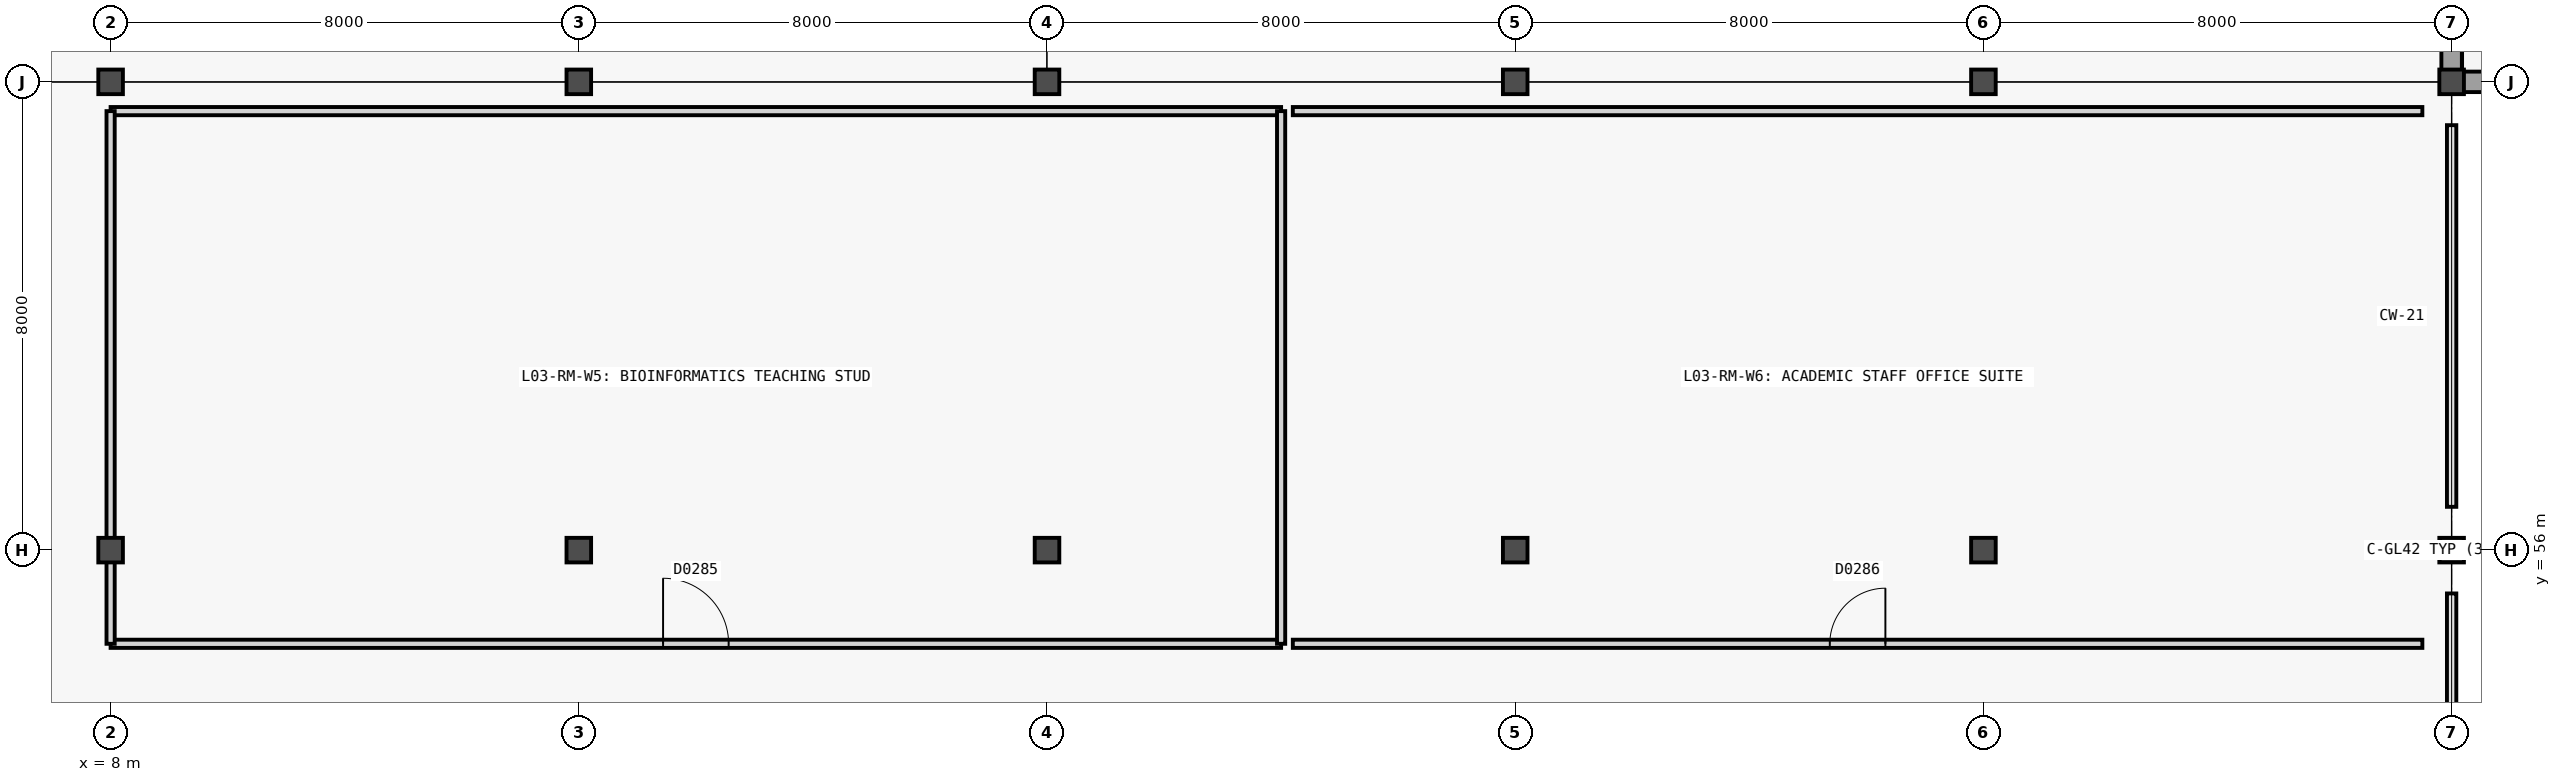
"""IFC4 building model, lengths in metres.
Left out: names, types, materials, properties, quantities, classifications, styles, units other than length and angle.
Written with IfcOpenShell. Run it as: python <this file> out.ifc"""

import sys

from ifc_helpers import new_model, si_unit, direction, frame, frame_2d, origin, origin_2d, place, context, subcontext, project, spatial, rectangle, extrude, element, fill, save


model = new_model("IFC4")
c1 = context("Model", 3, precision=1e-05, world=origin(), true_north=direction((0.0, 1.0)))
c2 = subcontext(c1, "Body", "Model", "MODEL_VIEW")
j1 = project(units=[si_unit("LENGTHUNIT", "METRE"), si_unit("PLANEANGLEUNIT", "RADIAN")], contexts=[c1])
p1 = place(None, origin())
s1 = spatial("IfcSite", under=j1, at=p1, CompositionType="ELEMENT")
p2 = place(p1, origin())
s2 = spatial("IfcBuilding", under=s1, at=p2, CompositionType="ELEMENT")
p3 = place(p2, frame((0.0, 0.0, 14.4)))
s3 = spatial("IfcBuildingStorey", under=s2, at=p3, CompositionType="ELEMENT", Elevation=14.4)
for number, where, z_axis, x_axis in (
    (1, (8.0, 56.0, 0.0), (0.0, 0.0, 1.0), (1.0, 0.0, 0.0)),
    (2, (8.0, 64.0, 0.0), (0.0, 0.0, 1.0), (1.0, 0.0, 0.0)),
    (3, (16.0, 56.0, 0.0), (0.0, 0.0, 1.0), (1.0, 0.0, 0.0)),
    (4, (16.0, 64.0, 0.0), (0.0, 0.0, 1.0), (1.0, 0.0, 0.0)),
    (5, (24.0, 56.0, 0.0), (0.0, 0.0, 1.0), (1.0, 0.0, 0.0)),
    (6, (24.0, 64.0, 0.0), (0.0, 0.0, 1.0), (1.0, 0.0, 0.0)),
    (7, (32.0, 56.0, 0.0), (0.0, 0.0, 1.0), (1.0, 0.0, 0.0)),
    (8, (32.0, 64.0, 0.0), (0.0, 0.0, 1.0), (1.0, 0.0, 0.0)),
    (9, (40.0, 56.0, 0.0), (0.0, 0.0, 1.0), (1.0, 0.0, 0.0)),
    (10, (40.0, 64.0, 0.0), (0.0, 0.0, 1.0), (1.0, 0.0, 0.0)),
    (11, (48.0, 56.0, 0.0), (0.0, 0.0, 1.0), (1.0, 0.0, 0.0)),
    (12, (48.0, 64.0, 0.0), (0.0, 0.0, 1.0), (1.0, 0.0, 0.0)),
):
    element("IfcColumn", number, at=place(p3, frame(where, z_axis=z_axis, x_axis=x_axis)), inside=s3, PredefinedType="COLUMN", context=c2, shape_type="SweptSolid", body=[
        extrude(rectangle(XDim=0.42, YDim=0.42, at=origin_2d()), origin(), (0.0, 0.0, 1.0), 3.6),
    ])
p4 = place(p3, frame((48.0, 64.0, 0.0), z_axis=(0.0, 0.0, 1.0), x_axis=(1.0, 0.0, 0.0)))
e13 = element("IfcWall", 13, at=p4, inside=s3, PredefinedType="SHEAR", context=c2, shape_type="SweptSolid", body=[
    extrude(rectangle(XDim=8.0, YDim=0.35, at=frame_2d((4.0, 0.0))), origin(), (0.0, 0.0, 1.0), 3.6),
])
p5 = place(p3, frame((48.0, 64.0, 0.0), z_axis=(0.0, 0.0, 1.0), x_axis=(0.0, 1.0, 0.0)))
e14 = element("IfcWall", 14, at=p5, inside=s3, PredefinedType="SHEAR", context=c2, shape_type="SweptSolid", body=[
    extrude(rectangle(XDim=8.4, YDim=0.35, at=frame_2d((4.2, 0.0))), origin(), (0.0, 0.0, 1.0), 3.6),
])
p6 = place(p3, frame((8.0, 54.4, 0.0), z_axis=(0.0, 0.0, 1.0), x_axis=(1.0, 0.0, 0.0)))
e15 = element("IfcWall", 15, at=p6, inside=s3, PredefinedType="PARTITIONING", context=c2, shape_type="SweptSolid", body=[
    extrude(rectangle(XDim=20.0, YDim=0.14, at=frame_2d((10.0, 0.0))), origin(), (0.0, 0.0, 1.0), 3.34),
])
p7 = place(p6, frame((9.44, 0.0, 0.0)))
e16 = element("IfcOpeningElement", 16, at=p7, cuts=e15, PredefinedType="OPENING", context=c2, shape_type="SweptSolid", body=[
    extrude(rectangle(XDim=1.12, YDim=2.15, at=frame_2d((0.56, 1.075))), frame((0.0, 0.08, 0.0), z_axis=(0.0, -1.0, 0.0), x_axis=(1.0, 0.0, 0.0)), (0.0, 0.0, 1.0), 0.16),
])
p8 = place(p3, frame((8.0, 63.5, 0.0), z_axis=(0.0, 0.0, 1.0), x_axis=(1.0, 0.0, 0.0)))
e17 = element("IfcWall", 17, at=p8, inside=s3, PredefinedType="PARTITIONING", context=c2, shape_type="SweptSolid", body=[
    extrude(rectangle(XDim=20.0, YDim=0.14, at=frame_2d((10.0, 0.0))), origin(), (0.0, 0.0, 1.0), 3.34),
])
p9 = place(p3, frame((8.0, 54.4, 0.0), z_axis=(0.0, 0.0, 1.0), x_axis=(0.0, 1.0, 0.0)))
e18 = element("IfcWall", 18, at=p9, inside=s3, PredefinedType="PARTITIONING", context=c2, shape_type="SweptSolid", body=[
    extrude(rectangle(XDim=9.1, YDim=0.14, at=frame_2d((4.55, 0.0))), origin(), (0.0, 0.0, 1.0), 2.78),
])
p10 = place(p3, frame((28.0, 54.4, 0.0), z_axis=(0.0, 0.0, 1.0), x_axis=(0.0, 1.0, 0.0)))
e19 = element("IfcWall", 19, at=p10, inside=s3, PredefinedType="PARTITIONING", context=c2, shape_type="SweptSolid", body=[
    extrude(rectangle(XDim=9.1, YDim=0.14, at=frame_2d((4.55, 0.0))), origin(), (0.0, 0.0, 1.0), 2.94),
])
p11 = place(p3, frame((28.2, 54.4, 0.0), z_axis=(0.0, 0.0, 1.0), x_axis=(1.0, 0.0, 0.0)))
e20 = element("IfcWall", 20, at=p11, inside=s3, PredefinedType="PARTITIONING", context=c2, shape_type="SweptSolid", body=[
    extrude(rectangle(XDim=19.3, YDim=0.14, at=frame_2d((9.65, 0.0))), origin(), (0.0, 0.0, 1.0), 3.34),
])
p12 = place(p11, frame((9.175, 0.0, 0.0)))
e21 = element("IfcOpeningElement", 21, at=p12, cuts=e20, PredefinedType="OPENING", context=c2, shape_type="SweptSolid", body=[
    extrude(rectangle(XDim=0.95, YDim=2.1, at=frame_2d((0.475, 1.05))), frame((0.0, 0.08, 0.0), z_axis=(0.0, -1.0, 0.0), x_axis=(1.0, 0.0, 0.0)), (0.0, 0.0, 1.0), 0.16),
])
p13 = place(p3, frame((28.2, 63.5, 0.0), z_axis=(0.0, 0.0, 1.0), x_axis=(1.0, 0.0, 0.0)))
e22 = element("IfcWall", 22, at=p13, inside=s3, PredefinedType="PARTITIONING", context=c2, shape_type="SweptSolid", body=[
    extrude(rectangle(XDim=19.3, YDim=0.14, at=frame_2d((9.65, 0.0))), origin(), (0.0, 0.0, 1.0), 3.34),
])
p14 = place(p7, origin())
e23 = element("IfcDoor", 23, at=p14, inside=s3, OperationType="SINGLE_SWING_LEFT", PredefinedType="DOOR", context=c2, shape_type="SweptSolid", body=[
    extrude(rectangle(XDim=1.12, YDim=2.15, at=frame_2d((0.56, 1.075))), frame((0.0, 0.025, 0.0), z_axis=(0.0, -1.0, 0.0), x_axis=(1.0, 0.0, 0.0)), (0.0, 0.0, 1.0), 0.05),
])
fill(e16, e23)
p15 = place(p12, origin())
e24 = element("IfcDoor", 24, at=p15, inside=s3, OperationType="SINGLE_SWING_RIGHT", PredefinedType="DOOR", context=c2, shape_type="SweptSolid", body=[
    extrude(rectangle(XDim=0.95, YDim=2.1, at=frame_2d((0.475, 1.05))), frame((0.0, 0.025, 0.0), z_axis=(0.0, -1.0, 0.0), x_axis=(1.0, 0.0, 0.0)), (0.0, 0.0, 1.0), 0.05),
])
fill(e21, e24)
save(model, sys.argv[1])
